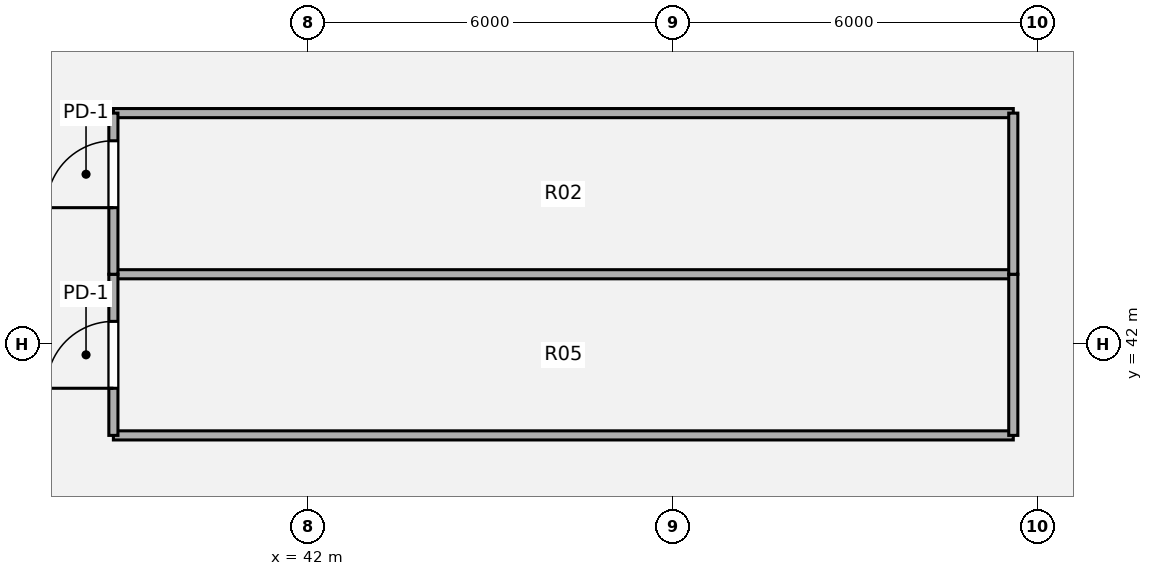
"""IFC4 building model, lengths in metres.
Left out: names, types, materials, properties, quantities, classifications, styles, units other than length and angle.
Written with IfcOpenShell. Run it as: python <this file> out.ifc"""

import sys

from ifc_helpers import new_model, si_unit, direction, frame, frame_2d, origin, origin_2d, place, context, subcontext, project, spatial, rectangle, hollow_circle, extrude, source, transform, mapped, element, fill, save


model = new_model("IFC4")
c1 = context("Model", 3, precision=1e-05, world=origin(), true_north=direction((0.0, 1.0)))
c2 = subcontext(c1, "Body", "Model", "MODEL_VIEW")
j1 = project(units=[si_unit("LENGTHUNIT", "METRE"), si_unit("PLANEANGLEUNIT", "RADIAN")], contexts=[c1])
p1 = place(None, origin())
s1 = spatial("IfcSite", under=j1, at=p1, CompositionType="ELEMENT")
p2 = place(p1, origin())
s2 = spatial("IfcBuilding", under=s1, at=p2, CompositionType="ELEMENT")
p3 = place(p2, frame((0.0, 0.0, 213.12)))
s3 = spatial("IfcBuildingStorey", under=s2, at=p3, CompositionType="ELEMENT", Elevation=213.12)
m1 = source(origin(), c2, "Body", "SweptSolid", [
    extrude(hollow_circle(Radius=0.55, WallThickness=0.04, at=origin_2d()), origin(), (0.0, 0.0, 1.0), 6.834),
])
p4 = place(p3, frame((54.175, 35.308, 0.393), z_axis=(-0.14060814626, 0.665995343173, 0.732584160406), x_axis=(-0.978431573463, -0.206571188819, 0.0)))
e1 = element("IfcColumn", 1, at=p4, inside=s3, PredefinedType="COLUMN", context=c2, shape_type="MappedRepresentation", body=[
    mapped(m1, transform((0.0, 0.0, 0.0), x_axis=(1.0, 0.0, 0.0), y_axis=(0.0, 1.0, 0.0), z_axis=(0.0, 0.0, 1.0), scale=1.0)),
])
m2 = source(origin(), c2, "Body", "SweptSolid", [
    extrude(hollow_circle(Radius=0.55, WallThickness=0.04, at=origin_2d()), origin(), (0.0, 0.0, 1.0), 6.654),
])
p5 = place(p3, frame((54.177, 46.372, 0.38), z_axis=(-0.144787640701, 0.640169783911, 0.754466160187), x_axis=(-0.975364614576, -0.220598886291, 0.0)))
e2 = element("IfcColumn", 2, at=p5, inside=s3, PredefinedType="COLUMN", context=c2, shape_type="MappedRepresentation", body=[
    mapped(m2, transform((0.0, 0.0, 0.0), x_axis=(1.0, 0.0, 0.0), y_axis=(0.0, 1.0, 0.0), z_axis=(0.0, 0.0, 1.0), scale=1.0)),
])
m3 = source(origin(), c2, "Body", "SweptSolid", [
    extrude(hollow_circle(Radius=0.55, WallThickness=0.04, at=origin_2d()), origin(), (0.0, 0.0, 1.0), 6.772),
])
p6 = place(p3, frame((40.65, 35.304, 0.389), z_axis=(0.0, 0.672670999613, 0.73994170465), x_axis=(-1.0, 0.0, 0.0)))
e3 = element("IfcColumn", 3, at=p6, inside=s3, PredefinedType="COLUMN", context=c2, shape_type="MappedRepresentation", body=[
    mapped(m3, transform((0.0, 0.0, 0.0), x_axis=(1.0, 0.0, 0.0), y_axis=(0.0, 1.0, 0.0), z_axis=(0.0, 0.0, 1.0), scale=1.0)),
])
p7 = place(p3, frame((38.8, 40.5, 0.0), z_axis=(0.0, 0.0, 1.0), x_axis=(1.0, 0.0, 0.0)))
e4 = element("IfcWall", 4, at=p7, inside=s3, PredefinedType="PARTITIONING", context=c2, shape_type="SweptSolid", body=[
    extrude(rectangle(XDim=14.8, YDim=0.15, at=frame_2d((7.4, 0.0))), origin(), (0.0, 0.0, 1.0), 5.05),
])
p8 = place(p3, frame((38.8, 43.15, 0.0), z_axis=(0.0, 0.0, 1.0), x_axis=(1.0, 0.0, 0.0)))
e5 = element("IfcWall", 5, at=p8, inside=s3, PredefinedType="PARTITIONING", context=c2, shape_type="SweptSolid", body=[
    extrude(rectangle(XDim=14.8, YDim=0.15, at=frame_2d((7.4, 0.0))), origin(), (0.0, 0.0, 1.0), 4.065),
])
p9 = place(p3, frame((38.8, 45.8, 0.0), z_axis=(0.0, 0.0, 1.0), x_axis=(1.0, 0.0, 0.0)))
e6 = element("IfcWall", 6, at=p9, inside=s3, PredefinedType="PARTITIONING", context=c2, shape_type="SweptSolid", body=[
    extrude(rectangle(XDim=14.8, YDim=0.15, at=frame_2d((7.4, 0.0))), origin(), (0.0, 0.0, 1.0), 4.809),
])
p10 = place(p3, frame((38.8, 40.5, 0.0), z_axis=(0.0, 0.0, 1.0), x_axis=(0.0, 1.0, 0.0)))
e7 = element("IfcWall", 7, at=p10, inside=s3, PredefinedType="PARTITIONING", context=c2, shape_type="SweptSolid", body=[
    extrude(rectangle(XDim=2.65, YDim=0.15, at=frame_2d((1.325, 0.0))), origin(), (0.0, 0.0, 1.0), 5.05),
])
p11 = place(p10, frame((0.775, 0.0, 0.0)))
e8 = element("IfcOpeningElement", 8, at=p11, cuts=e7, PredefinedType="OPENING", context=c2, shape_type="SweptSolid", body=[
    extrude(rectangle(XDim=1.1, YDim=2.1, at=origin_2d()), frame((0.55, 0.085, 1.05), z_axis=(0.0, -1.0, 0.0), x_axis=(1.0, 0.0, 0.0)), (0.0, 0.0, 1.0), 0.17),
])
p12 = place(p3, frame((38.8, 43.15, 0.0), z_axis=(0.0, 0.0, 1.0), x_axis=(0.0, 1.0, 0.0)))
e9 = element("IfcWall", 9, at=p12, inside=s3, PredefinedType="PARTITIONING", context=c2, shape_type="SweptSolid", body=[
    extrude(rectangle(XDim=2.65, YDim=0.15, at=frame_2d((1.325, 0.0))), origin(), (0.0, 0.0, 1.0), 5.05),
])
p13 = place(p12, frame((1.095, 0.0, 0.0)))
e10 = element("IfcOpeningElement", 10, at=p13, cuts=e9, PredefinedType="OPENING", context=c2, shape_type="SweptSolid", body=[
    extrude(rectangle(XDim=1.1, YDim=2.1, at=origin_2d()), frame((0.55, 0.085, 1.05), z_axis=(0.0, -1.0, 0.0), x_axis=(1.0, 0.0, 0.0)), (0.0, 0.0, 1.0), 0.17),
])
p14 = place(p3, frame((53.6, 40.5, 0.0), z_axis=(0.0, 0.0, 1.0), x_axis=(0.0, 1.0, 0.0)))
e11 = element("IfcWall", 11, at=p14, inside=s3, PredefinedType="PARTITIONING", context=c2, shape_type="SweptSolid", body=[
    extrude(rectangle(XDim=2.65, YDim=0.15, at=frame_2d((1.325, 0.0))), origin(), (0.0, 0.0, 1.0), 5.05),
])
p15 = place(p3, frame((53.6, 43.15, 0.0), z_axis=(0.0, 0.0, 1.0), x_axis=(0.0, 1.0, 0.0)))
e12 = element("IfcWall", 12, at=p15, inside=s3, PredefinedType="PARTITIONING", context=c2, shape_type="SweptSolid", body=[
    extrude(rectangle(XDim=2.65, YDim=0.15, at=frame_2d((1.325, 0.0))), origin(), (0.0, 0.0, 1.0), 5.05),
])
m4 = source(origin(), c2, "Body", "SweptSolid", [
    extrude(rectangle(XDim=1.1, YDim=2.1, at=origin_2d()), frame((0.55, 0.025, 1.05), z_axis=(0.0, -1.0, 0.0), x_axis=(1.0, 0.0, 0.0)), (0.0, 0.0, 1.0), 0.05),
])
p16 = place(p11, origin())
e13 = element("IfcDoor", 13, at=p16, inside=s3, OperationType="SINGLE_SWING_LEFT", PredefinedType="DOOR", context=c2, shape_type="MappedRepresentation", body=[
    mapped(m4, transform((0.0, 0.0, 0.0), x_axis=(1.0, 0.0, 0.0), y_axis=(0.0, 1.0, 0.0), z_axis=(0.0, 0.0, 1.0), scale=1.0)),
])
fill(e8, e13)
p17 = place(p13, origin())
e14 = element("IfcDoor", 14, at=p17, inside=s3, OperationType="SINGLE_SWING_LEFT", PredefinedType="DOOR", context=c2, shape_type="MappedRepresentation", body=[
    mapped(m4, transform((0.0, 0.0, 0.0), x_axis=(1.0, 0.0, 0.0), y_axis=(0.0, 1.0, 0.0), z_axis=(0.0, 0.0, 1.0), scale=1.0)),
])
fill(e10, e14)
save(model, sys.argv[1])
